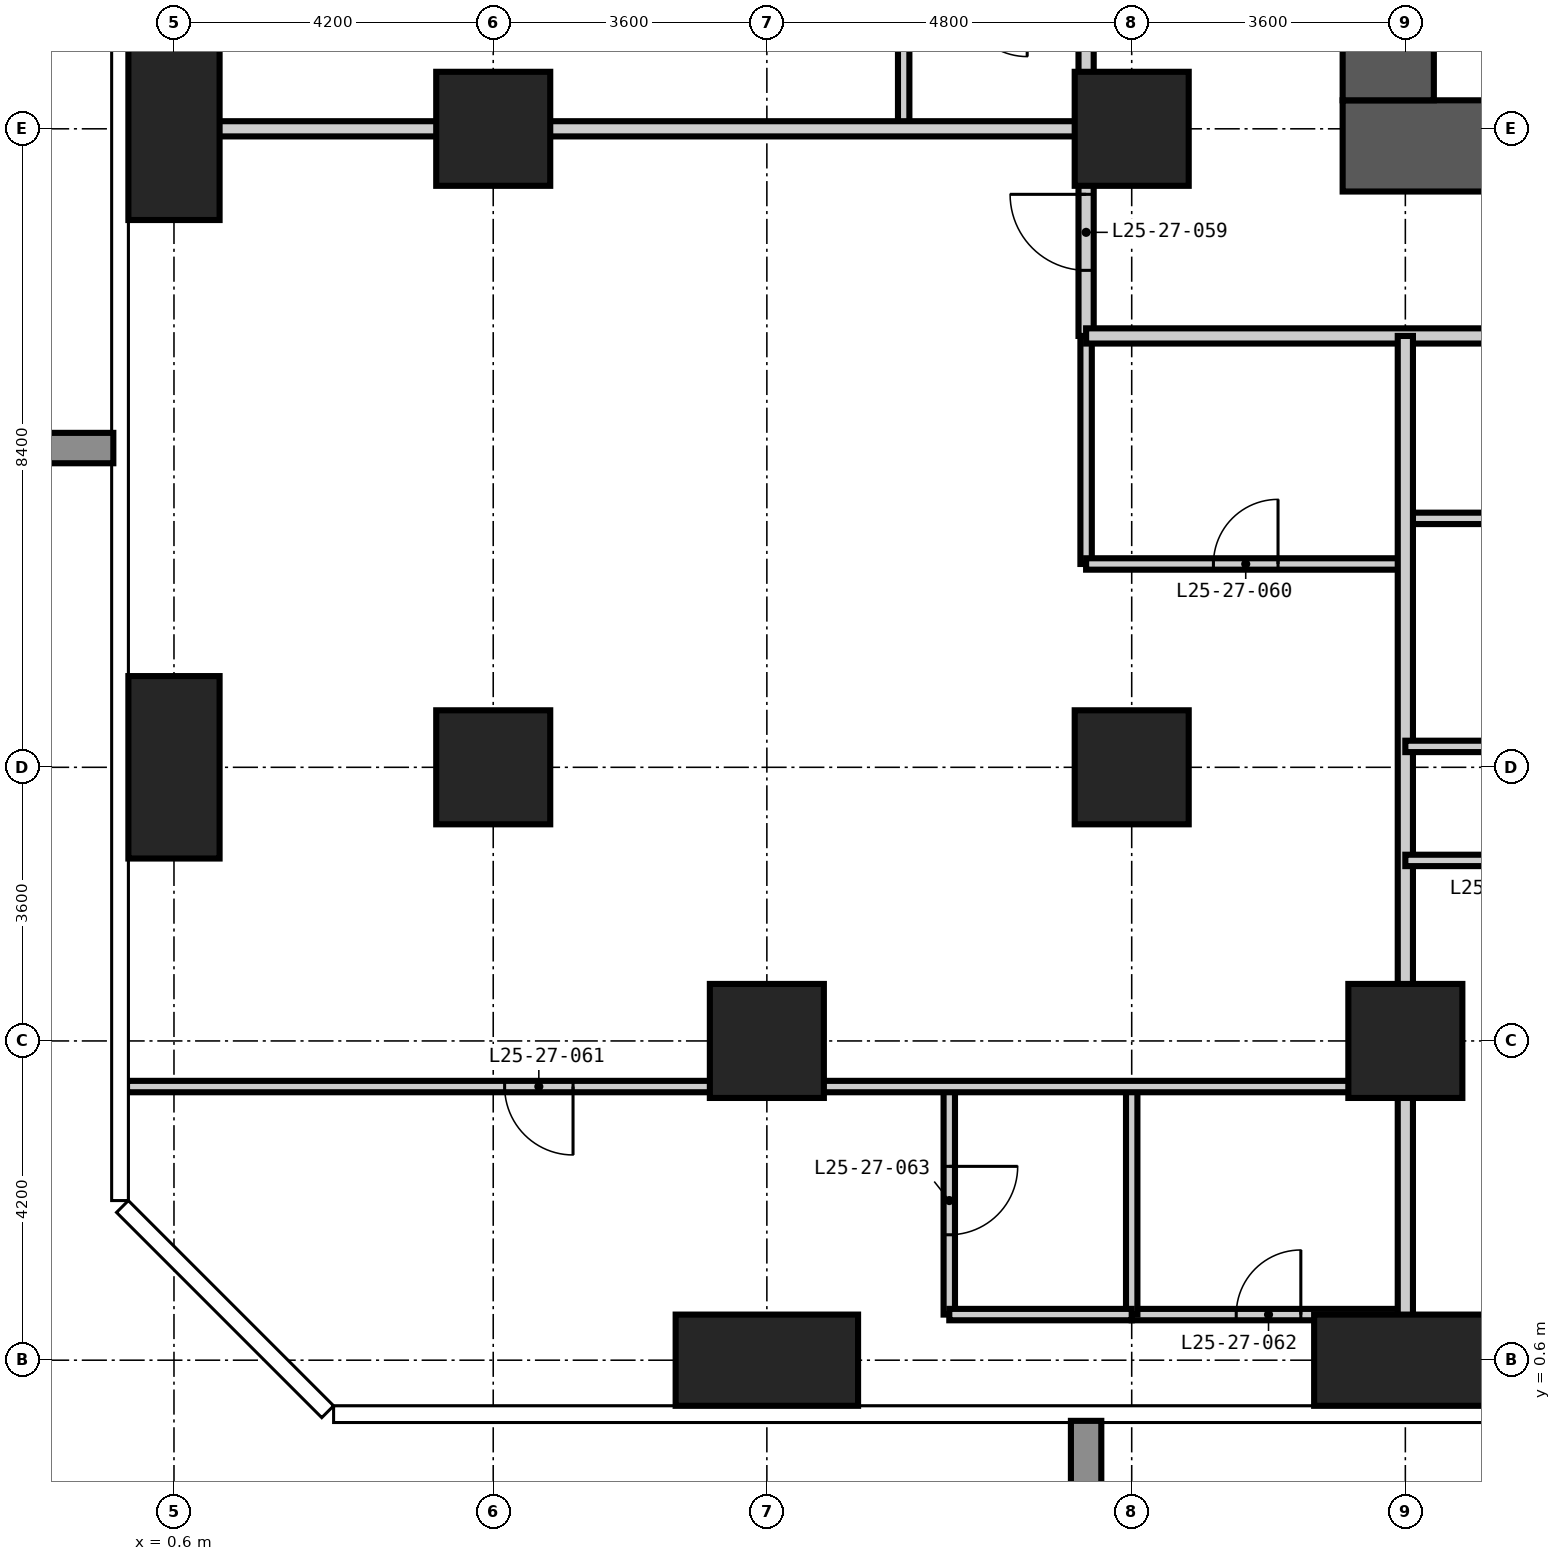
"""IFC4 building model, lengths in metres.
Left out: names, types, materials, properties, quantities, classifications, styles, units other than length and angle.
Written with IfcOpenShell. Run it as: python <this file> out.ifc"""

import sys

from ifc_helpers import new_model, si_unit, direction, frame, frame_2d, origin, origin_2d, place, context, subcontext, project, spatial, rectangle, extrude, element, fill, save


model = new_model("IFC4")
c1 = context("Model", 3, precision=1e-05, world=origin(), true_north=direction((0.0, 1.0)))
c2 = subcontext(c1, "Body", "Model", "MODEL_VIEW")
j1 = project(units=[si_unit("LENGTHUNIT", "METRE"), si_unit("PLANEANGLEUNIT", "RADIAN")], contexts=[c1])
p1 = place(None, origin())
s1 = spatial("IfcSite", under=j1, at=p1, CompositionType="ELEMENT")
p2 = place(p1, origin())
s2 = spatial("IfcBuilding", under=s1, at=p2, CompositionType="ELEMENT")
p3 = place(p2, frame((0.0, 0.0, 100.8)))
s3 = spatial("IfcBuildingStorey", under=s2, at=p3, CompositionType="ELEMENT", Elevation=100.8)
for number, where, z_axis, x_axis in (
    (1, (0.6, 8.4, -0.35), (0.0, 0.0, 1.0), (1.0, 0.0, 0.0)),
    (2, (0.6, 16.8, -0.35), (0.0, 0.0, 1.0), (1.0, 0.0, 0.0)),
):
    element("IfcColumn", number, at=place(p3, frame(where, z_axis=z_axis, x_axis=x_axis)), inside=s3, PredefinedType="COLUMN", context=c2, shape_type="SweptSolid", body=[
        extrude(rectangle(XDim=1.2, YDim=2.4, at=origin_2d()), origin(), (0.0, 0.0, 1.0), 3.6),
    ])
for number, where, z_axis, x_axis in (
    (3, (4.8, 8.4, -0.35), (0.0, 0.0, 1.0), (1.0, 0.0, 0.0)),
    (4, (4.8, 16.8, -0.35), (0.0, 0.0, 1.0), (1.0, 0.0, 0.0)),
):
    element("IfcColumn", number, at=place(p3, frame(where, z_axis=z_axis, x_axis=x_axis)), inside=s3, PredefinedType="COLUMN", context=c2, shape_type="SweptSolid", body=[
        extrude(rectangle(XDim=1.5, YDim=1.5, at=origin_2d()), origin(), (0.0, 0.0, 1.0), 3.6),
    ])
p4 = place(p3, frame((8.4, 0.6, -0.35), z_axis=(0.0, 0.0, 1.0), x_axis=(1.0, 0.0, 0.0)))
e5 = element("IfcColumn", 5, at=p4, inside=s3, PredefinedType="COLUMN", context=c2, shape_type="SweptSolid", body=[
    extrude(rectangle(XDim=2.4, YDim=1.2, at=origin_2d()), origin(), (0.0, 0.0, 1.0), 3.6),
])
for number, where, z_axis, x_axis in (
    (6, (8.4, 4.8, -0.35), (0.0, 0.0, 1.0), (1.0, 0.0, 0.0)),
    (7, (13.2, 8.4, -0.35), (0.0, 0.0, 1.0), (1.0, 0.0, 0.0)),
    (8, (13.2, 16.8, -0.35), (0.0, 0.0, 1.0), (1.0, 0.0, 0.0)),
):
    element("IfcColumn", number, at=place(p3, frame(where, z_axis=z_axis, x_axis=x_axis)), inside=s3, PredefinedType="COLUMN", context=c2, shape_type="SweptSolid", body=[
        extrude(rectangle(XDim=1.5, YDim=1.5, at=origin_2d()), origin(), (0.0, 0.0, 1.0), 3.6),
    ])
p5 = place(p3, frame((16.8, 0.6, -0.35), z_axis=(0.0, 0.0, 1.0), x_axis=(1.0, 0.0, 0.0)))
e9 = element("IfcColumn", 9, at=p5, inside=s3, PredefinedType="COLUMN", context=c2, shape_type="SweptSolid", body=[
    extrude(rectangle(XDim=2.4, YDim=1.2, at=origin_2d()), origin(), (0.0, 0.0, 1.0), 3.6),
])
p6 = place(p3, frame((16.8, 4.8, -0.35), z_axis=(0.0, 0.0, 1.0), x_axis=(1.0, 0.0, 0.0)))
e10 = element("IfcColumn", 10, at=p6, inside=s3, PredefinedType="COLUMN", context=c2, shape_type="SweptSolid", body=[
    extrude(rectangle(XDim=1.5, YDim=1.5, at=origin_2d()), origin(), (0.0, 0.0, 1.0), 3.6),
])
p7 = place(p3, frame((15.975, 16.575, -0.35), z_axis=(0.0, 0.0, 1.0), x_axis=(1.0, 0.0, 0.0)))
e11 = element("IfcWall", 11, at=p7, inside=s3, PredefinedType="SHEAR", context=c2, shape_type="SweptSolid", body=[
    extrude(rectangle(XDim=26.85, YDim=1.2, at=frame_2d((13.425, 0.0))), origin(), (0.0, 0.0, 1.0), 3.6),
])
p8 = place(p7, frame((12.925, 0.0, 0.35)))
e12 = element("IfcOpeningElement", 12, at=p8, cuts=e11, PredefinedType="OPENING", context=c2, shape_type="SweptSolid", body=[
    extrude(rectangle(XDim=1.0, YDim=2.1, at=frame_2d((0.5, 1.05))), frame((0.0, 0.61, 0.0), z_axis=(0.0, -1.0, 0.0), x_axis=(1.0, 0.0, 0.0)), (0.0, 0.0, 1.0), 1.22),
])
p9 = place(p7, frame((19.225, 0.0, 0.35)))
e13 = element("IfcOpeningElement", 13, at=p9, cuts=e11, PredefinedType="OPENING", context=c2, shape_type="SweptSolid", body=[
    extrude(rectangle(XDim=1.0, YDim=2.1, at=frame_2d((0.5, 1.05))), frame((0.0, 0.61, 0.0), z_axis=(0.0, -1.0, 0.0), x_axis=(1.0, 0.0, 0.0)), (0.0, 0.0, 1.0), 1.22),
])
p10 = place(p3, frame((16.575, 41.625, -0.35), z_axis=(0.0, 0.0, 1.0), x_axis=(0.0, -1.0, 0.0)))
e14 = element("IfcWall", 14, at=p10, inside=s3, PredefinedType="SHEAR", context=c2, shape_type="SweptSolid", body=[
    extrude(rectangle(XDim=24.45, YDim=1.2, at=frame_2d((12.225, 0.0))), origin(), (0.0, 0.0, 1.0), 3.6),
])
p11 = place(p10, frame((11.325, 0.0, 0.35)))
e15 = element("IfcOpeningElement", 15, at=p11, cuts=e14, PredefinedType="OPENING", context=c2, shape_type="SweptSolid", body=[
    extrude(rectangle(XDim=1.8, YDim=2.2, at=frame_2d((0.9, 1.1))), frame((0.0, 0.61, 0.0), z_axis=(0.0, -1.0, 0.0), x_axis=(1.0, 0.0, 0.0)), (0.0, 0.0, 1.0), 1.22),
])
p12 = place(p10, frame((20.125, 0.0, 0.35)))
e16 = element("IfcOpeningElement", 16, at=p12, cuts=e14, PredefinedType="OPENING", context=c2, shape_type="SweptSolid", body=[
    extrude(rectangle(XDim=1.0, YDim=2.1, at=frame_2d((0.5, 1.05))), frame((0.0, 0.61, 0.0), z_axis=(0.0, -1.0, 0.0), x_axis=(1.0, 0.0, 0.0)), (0.0, 0.0, 1.0), 1.22),
])
p13 = place(p10, frame((5.425, 0.0, 0.35)))
e17 = element("IfcOpeningElement", 17, at=p13, cuts=e14, PredefinedType="OPENING", context=c2, shape_type="SweptSolid", body=[
    extrude(rectangle(XDim=1.0, YDim=2.1, at=frame_2d((0.5, 1.05))), frame((0.0, 0.61, 0.0), z_axis=(0.0, -1.0, 0.0), x_axis=(1.0, 0.0, 0.0)), (0.0, 0.0, 1.0), 1.22),
])
p14 = place(p3, frame((10.2, 16.8, 0.0), z_axis=(0.0, 0.0, 1.0), x_axis=(0.0, 1.0, 0.0)))
e18 = element("IfcWall", 18, at=p14, inside=s3, PredefinedType="PARTITIONING", context=c2, shape_type="SweptSolid", body=[
    extrude(rectangle(XDim=1.8, YDim=0.15, at=frame_2d((0.9, 0.0))), origin(), (0.0, 0.0, 1.0), 3.25),
])
p15 = place(p3, frame((12.6, 11.075, 0.0), z_axis=(0.0, 0.0, 1.0), x_axis=(0.0, 1.0, 0.0)))
e19 = element("IfcWall", 19, at=p15, inside=s3, PredefinedType="PARTITIONING", context=c2, shape_type="SweptSolid", body=[
    extrude(rectangle(XDim=3.0, YDim=0.15, at=frame_2d((1.5, 0.0))), origin(), (0.0, 0.0, 1.0), 3.25),
])
p16 = place(p3, frame((13.2, 1.2, 0.0), z_axis=(0.0, 0.0, 1.0), x_axis=(1.0, 0.0, 0.0)))
e20 = element("IfcWall", 20, at=p16, inside=s3, PredefinedType="PARTITIONING", context=c2, shape_type="SweptSolid", body=[
    extrude(rectangle(XDim=3.6, YDim=0.15, at=frame_2d((1.8, 0.0))), origin(), (0.0, 0.0, 1.0), 3.25),
])
p17 = place(p16, frame((1.375, 0.0, 0.0)))
e21 = element("IfcOpeningElement", 21, at=p17, cuts=e20, PredefinedType="OPENING", context=c2, shape_type="SweptSolid", body=[
    extrude(rectangle(XDim=0.85, YDim=2.1, at=frame_2d((0.425, 1.05))), frame((0.0, 0.085, 0.0), z_axis=(0.0, -1.0, 0.0), x_axis=(1.0, 0.0, 0.0)), (0.0, 0.0, 1.0), 0.17),
])
p18 = place(p3, frame((12.6, 11.075, 0.0), z_axis=(0.0, 0.0, 1.0), x_axis=(1.0, 0.0, 0.0)))
e22 = element("IfcWall", 22, at=p18, inside=s3, PredefinedType="PARTITIONING", context=c2, shape_type="SweptSolid", body=[
    extrude(rectangle(XDim=4.2, YDim=0.15, at=frame_2d((2.1, 0.0))), origin(), (0.0, 0.0, 1.0), 3.25),
])
p19 = place(p18, frame((1.675, 0.0, 0.0)))
e23 = element("IfcOpeningElement", 23, at=p19, cuts=e22, PredefinedType="OPENING", context=c2, shape_type="SweptSolid", body=[
    extrude(rectangle(XDim=0.85, YDim=2.1, at=frame_2d((0.425, 1.05))), frame((0.0, 0.085, 0.0), z_axis=(0.0, -1.0, 0.0), x_axis=(1.0, 0.0, 0.0)), (0.0, 0.0, 1.0), 0.17),
])
p20 = place(p3, frame((16.8, 11.675, 0.0), z_axis=(0.0, 0.0, 1.0), x_axis=(1.0, 0.0, 0.0)))
e24 = element("IfcWall", 24, at=p20, inside=s3, PredefinedType="PARTITIONING", context=c2, shape_type="SweptSolid", body=[
    extrude(rectangle(XDim=3.0, YDim=0.15, at=frame_2d((1.5, 0.0))), origin(), (0.0, 0.0, 1.0), 3.25),
])
p21 = place(p3, frame((12.6, 14.075, 0.0), z_axis=(0.0, 0.0, 1.0), x_axis=(0.0, 1.0, 0.0)))
e25 = element("IfcWall", 25, at=p21, inside=s3, PredefinedType="PARTITIONING", context=c2, shape_type="SweptSolid", body=[
    extrude(rectangle(XDim=31.25, YDim=0.2, at=frame_2d((15.625, 0.0))), origin(), (0.0, 0.0, 1.0), 3.25),
])
p22 = place(p21, frame((5.225, 0.0, 0.0)))
e26 = element("IfcOpeningElement", 26, at=p22, cuts=e25, PredefinedType="OPENING", context=c2, shape_type="SweptSolid", body=[
    extrude(rectangle(XDim=1.0, YDim=2.2, at=frame_2d((0.5, 1.1))), frame((0.0, 0.11, 0.0), z_axis=(0.0, -1.0, 0.0), x_axis=(1.0, 0.0, 0.0)), (0.0, 0.0, 1.0), 0.22),
])
p23 = place(p21, frame((13.625, 0.0, 0.0)))
e27 = element("IfcOpeningElement", 27, at=p23, cuts=e25, PredefinedType="OPENING", context=c2, shape_type="SweptSolid", body=[
    extrude(rectangle(XDim=1.0, YDim=2.2, at=frame_2d((0.5, 1.1))), frame((0.0, 0.11, 0.0), z_axis=(0.0, -1.0, 0.0), x_axis=(1.0, 0.0, 0.0)), (0.0, 0.0, 1.0), 0.22),
])
p24 = place(p21, frame((22.025, 0.0, 0.0)))
e28 = element("IfcOpeningElement", 28, at=p24, cuts=e25, PredefinedType="OPENING", context=c2, shape_type="SweptSolid", body=[
    extrude(rectangle(XDim=1.0, YDim=2.2, at=frame_2d((0.5, 1.1))), frame((0.0, 0.11, 0.0), z_axis=(0.0, -1.0, 0.0), x_axis=(1.0, 0.0, 0.0)), (0.0, 0.0, 1.0), 0.22),
])
p25 = place(p21, frame((0.863, 0.0, 0.0)))
e29 = element("IfcOpeningElement", 29, at=p25, cuts=e25, PredefinedType="OPENING", context=c2, shape_type="SweptSolid", body=[
    extrude(rectangle(XDim=1.0, YDim=2.2, at=frame_2d((0.5, 1.1))), frame((0.0, 0.11, 0.0), z_axis=(0.0, -1.0, 0.0), x_axis=(1.0, 0.0, 0.0)), (0.0, 0.0, 1.0), 0.22),
])
p26 = place(p21, frame((29.088, 0.0, 0.0)))
e30 = element("IfcOpeningElement", 30, at=p26, cuts=e25, PredefinedType="OPENING", context=c2, shape_type="SweptSolid", body=[
    extrude(rectangle(XDim=1.0, YDim=2.2, at=frame_2d((0.5, 1.1))), frame((0.0, 0.11, 0.0), z_axis=(0.0, -1.0, 0.0), x_axis=(1.0, 0.0, 0.0)), (0.0, 0.0, 1.0), 0.22),
])
p27 = place(p3, frame((45.925, 14.075, 0.0), z_axis=(0.0, 0.0, 1.0), x_axis=(-1.0, 0.0, 0.0)))
e31 = element("IfcWall", 31, at=p27, inside=s3, PredefinedType="PARTITIONING", context=c2, shape_type="SweptSolid", body=[
    extrude(rectangle(XDim=33.325, YDim=0.2, at=frame_2d((16.663, 0.0))), origin(), (0.0, 0.0, 1.0), 3.25),
])
p28 = place(p27, frame((26.525, 0.0, 0.0)))
e32 = element("IfcOpeningElement", 32, at=p28, cuts=e31, PredefinedType="OPENING", context=c2, shape_type="SweptSolid", body=[
    extrude(rectangle(XDim=1.0, YDim=2.2, at=frame_2d((0.5, 1.1))), frame((0.0, 0.11, 0.0), z_axis=(0.0, -1.0, 0.0), x_axis=(1.0, 0.0, 0.0)), (0.0, 0.0, 1.0), 0.22),
])
p29 = place(p27, frame((20.225, 0.0, 0.0)))
e33 = element("IfcOpeningElement", 33, at=p29, cuts=e31, PredefinedType="OPENING", context=c2, shape_type="SweptSolid", body=[
    extrude(rectangle(XDim=1.0, YDim=2.2, at=frame_2d((0.5, 1.1))), frame((0.0, 0.11, 0.0), z_axis=(0.0, -1.0, 0.0), x_axis=(1.0, 0.0, 0.0)), (0.0, 0.0, 1.0), 0.22),
])
p30 = place(p27, frame((11.825, 0.0, 0.0)))
e34 = element("IfcOpeningElement", 34, at=p30, cuts=e31, PredefinedType="OPENING", context=c2, shape_type="SweptSolid", body=[
    extrude(rectangle(XDim=1.0, YDim=2.2, at=frame_2d((0.5, 1.1))), frame((0.0, 0.11, 0.0), z_axis=(0.0, -1.0, 0.0), x_axis=(1.0, 0.0, 0.0)), (0.0, 0.0, 1.0), 0.22),
])
p31 = place(p27, frame((5.525, 0.0, 0.0)))
e35 = element("IfcOpeningElement", 35, at=p31, cuts=e31, PredefinedType="OPENING", context=c2, shape_type="SweptSolid", body=[
    extrude(rectangle(XDim=1.0, YDim=2.2, at=frame_2d((0.5, 1.1))), frame((0.0, 0.11, 0.0), z_axis=(0.0, -1.0, 0.0), x_axis=(1.0, 0.0, 0.0)), (0.0, 0.0, 1.0), 0.22),
])
p32 = place(p3, frame((16.8, -0.018, 0.0), z_axis=(0.0, 0.0, 1.0), x_axis=(0.0, 1.0, 0.0)))
e36 = element("IfcWall", 36, at=p32, inside=s3, PredefinedType="PARTITIONING", context=c2, shape_type="SweptSolid", body=[
    extrude(rectangle(XDim=14.093, YDim=0.2, at=frame_2d((7.046, 0.0))), origin(), (0.0, 0.0, 1.0), 3.25),
])
p33 = place(p3, frame((-0.018, 16.8, 0.0), z_axis=(0.0, 0.0, 1.0), x_axis=(1.0, 0.0, 0.0)))
e37 = element("IfcWall", 37, at=p33, inside=s3, PredefinedType="PARTITIONING", context=c2, shape_type="SweptSolid", body=[
    extrude(rectangle(XDim=12.618, YDim=0.2, at=frame_2d((6.309, 0.0))), origin(), (0.0, 0.0, 1.0), 3.25),
])
p34 = place(p3, frame((10.8, 1.2, 0.0), z_axis=(0.0, 0.0, 1.0), x_axis=(0.0, 1.0, 0.0)))
e38 = element("IfcWall", 38, at=p34, inside=s3, PredefinedType="PARTITIONING", context=c2, shape_type="SweptSolid", body=[
    extrude(rectangle(XDim=3.0, YDim=0.15, at=frame_2d((1.5, 0.0))), origin(), (0.0, 0.0, 1.0), 3.25),
])
p35 = place(p34, frame((1.05, 0.0, 0.0)))
e39 = element("IfcOpeningElement", 39, at=p35, cuts=e38, PredefinedType="OPENING", context=c2, shape_type="SweptSolid", body=[
    extrude(rectangle(XDim=0.9, YDim=2.1, at=frame_2d((0.45, 1.05))), frame((0.0, 0.085, 0.0), z_axis=(0.0, -1.0, 0.0), x_axis=(1.0, 0.0, 0.0)), (0.0, 0.0, 1.0), 0.17),
])
p36 = place(p3, frame((13.2, 1.2, 0.0), z_axis=(0.0, 0.0, 1.0), x_axis=(0.0, 1.0, 0.0)))
e40 = element("IfcWall", 40, at=p36, inside=s3, PredefinedType="PARTITIONING", context=c2, shape_type="SweptSolid", body=[
    extrude(rectangle(XDim=3.0, YDim=0.15, at=frame_2d((1.5, 0.0))), origin(), (0.0, 0.0, 1.0), 3.25),
])
p37 = place(p3, frame((10.8, 1.2, 0.0), z_axis=(0.0, 0.0, 1.0), x_axis=(1.0, 0.0, 0.0)))
e41 = element("IfcWall", 41, at=p37, inside=s3, PredefinedType="PARTITIONING", context=c2, shape_type="SweptSolid", body=[
    extrude(rectangle(XDim=2.4, YDim=0.15, at=frame_2d((1.2, 0.0))), origin(), (0.0, 0.0, 1.0), 3.25),
])
p38 = place(p3, frame((-0.018, 4.2, 0.0), z_axis=(0.0, 0.0, 1.0), x_axis=(1.0, 0.0, 0.0)))
e42 = element("IfcWall", 42, at=p38, inside=s3, PredefinedType="PARTITIONING", context=c2, shape_type="SweptSolid", body=[
    extrude(rectangle(XDim=16.818, YDim=0.15, at=frame_2d((8.409, 0.0))), origin(), (0.0, 0.0, 1.0), 3.25),
])
p39 = place(p38, frame((4.968, 0.0, 0.0)))
e43 = element("IfcOpeningElement", 43, at=p39, cuts=e42, PredefinedType="OPENING", context=c2, shape_type="SweptSolid", body=[
    extrude(rectangle(XDim=0.9, YDim=2.1, at=frame_2d((0.45, 1.05))), frame((0.0, 0.085, 0.0), z_axis=(0.0, -1.0, 0.0), x_axis=(1.0, 0.0, 0.0)), (0.0, 0.0, 1.0), 0.17),
])
p40 = place(p3, frame((16.8, 7.175, 0.0), z_axis=(0.0, 0.0, 1.0), x_axis=(1.0, 0.0, 0.0)))
e44 = element("IfcWall", 44, at=p40, inside=s3, PredefinedType="PARTITIONING", context=c2, shape_type="SweptSolid", body=[
    extrude(rectangle(XDim=3.0, YDim=0.15, at=frame_2d((1.5, 0.0))), origin(), (0.0, 0.0, 1.0), 3.25),
])
p41 = place(p40, frame((1.05, 0.0, 0.0)))
e45 = element("IfcOpeningElement", 45, at=p41, cuts=e44, PredefinedType="OPENING", context=c2, shape_type="SweptSolid", body=[
    extrude(rectangle(XDim=0.9, YDim=2.1, at=frame_2d((0.45, 1.05))), frame((0.0, 0.085, 0.0), z_axis=(0.0, -1.0, 0.0), x_axis=(1.0, 0.0, 0.0)), (0.0, 0.0, 1.0), 0.17),
])
p42 = place(p3, frame((16.8, 8.675, 0.0), z_axis=(0.0, 0.0, 1.0), x_axis=(1.0, 0.0, 0.0)))
e46 = element("IfcWall", 46, at=p42, inside=s3, PredefinedType="PARTITIONING", context=c2, shape_type="SweptSolid", body=[
    extrude(rectangle(XDim=3.0, YDim=0.15, at=frame_2d((1.5, 0.0))), origin(), (0.0, 0.0, 1.0), 3.25),
])
p43 = place(p25, origin())
e47 = element("IfcDoor", 47, at=p43, inside=s3, OperationType="SINGLE_SWING_RIGHT", PredefinedType="DOOR", context=c2, shape_type="SweptSolid", body=[
    extrude(rectangle(XDim=1.0, YDim=2.2, at=frame_2d((0.5, 1.1))), frame((0.0, 0.025, 0.0), z_axis=(0.0, -1.0, 0.0), x_axis=(1.0, 0.0, 0.0)), (0.0, 0.0, 1.0), 0.05),
])
fill(e29, e47)
p44 = place(p19, origin())
e48 = element("IfcDoor", 48, at=p44, inside=s3, OperationType="SINGLE_SWING_RIGHT", PredefinedType="DOOR", context=c2, shape_type="SweptSolid", body=[
    extrude(rectangle(XDim=0.85, YDim=2.1, at=frame_2d((0.425, 1.05))), frame((0.0, 0.025, 0.0), z_axis=(0.0, -1.0, 0.0), x_axis=(1.0, 0.0, 0.0)), (0.0, 0.0, 1.0), 0.05),
])
fill(e23, e48)
p45 = place(p39, frame((0.9, 0.0, 0.0), z_axis=(0.0, 0.0, 1.0), x_axis=(-1.0, 0.0, 0.0)))
e49 = element("IfcDoor", 49, at=p45, inside=s3, OperationType="SINGLE_SWING_LEFT", PredefinedType="DOOR", context=c2, shape_type="SweptSolid", body=[
    extrude(rectangle(XDim=0.9, YDim=2.1, at=frame_2d((0.45, 1.05))), frame((0.0, 0.025, 0.0), z_axis=(0.0, -1.0, 0.0), x_axis=(1.0, 0.0, 0.0)), (0.0, 0.0, 1.0), 0.05),
])
fill(e43, e49)
p46 = place(p17, origin())
e50 = element("IfcDoor", 50, at=p46, inside=s3, OperationType="SINGLE_SWING_RIGHT", PredefinedType="DOOR", context=c2, shape_type="SweptSolid", body=[
    extrude(rectangle(XDim=0.85, YDim=2.1, at=frame_2d((0.425, 1.05))), frame((0.0, 0.025, 0.0), z_axis=(0.0, -1.0, 0.0), x_axis=(1.0, 0.0, 0.0)), (0.0, 0.0, 1.0), 0.05),
])
fill(e21, e50)
p47 = place(p35, frame((0.9, 0.0, 0.0), z_axis=(0.0, 0.0, 1.0), x_axis=(-1.0, 0.0, 0.0)))
e51 = element("IfcDoor", 51, at=p47, inside=s3, OperationType="SINGLE_SWING_LEFT", PredefinedType="DOOR", context=c2, shape_type="SweptSolid", body=[
    extrude(rectangle(XDim=0.9, YDim=2.1, at=frame_2d((0.45, 1.05))), frame((0.0, 0.025, 0.0), z_axis=(0.0, -1.0, 0.0), x_axis=(1.0, 0.0, 0.0)), (0.0, 0.0, 1.0), 0.05),
])
fill(e39, e51)
save(model, sys.argv[1])
